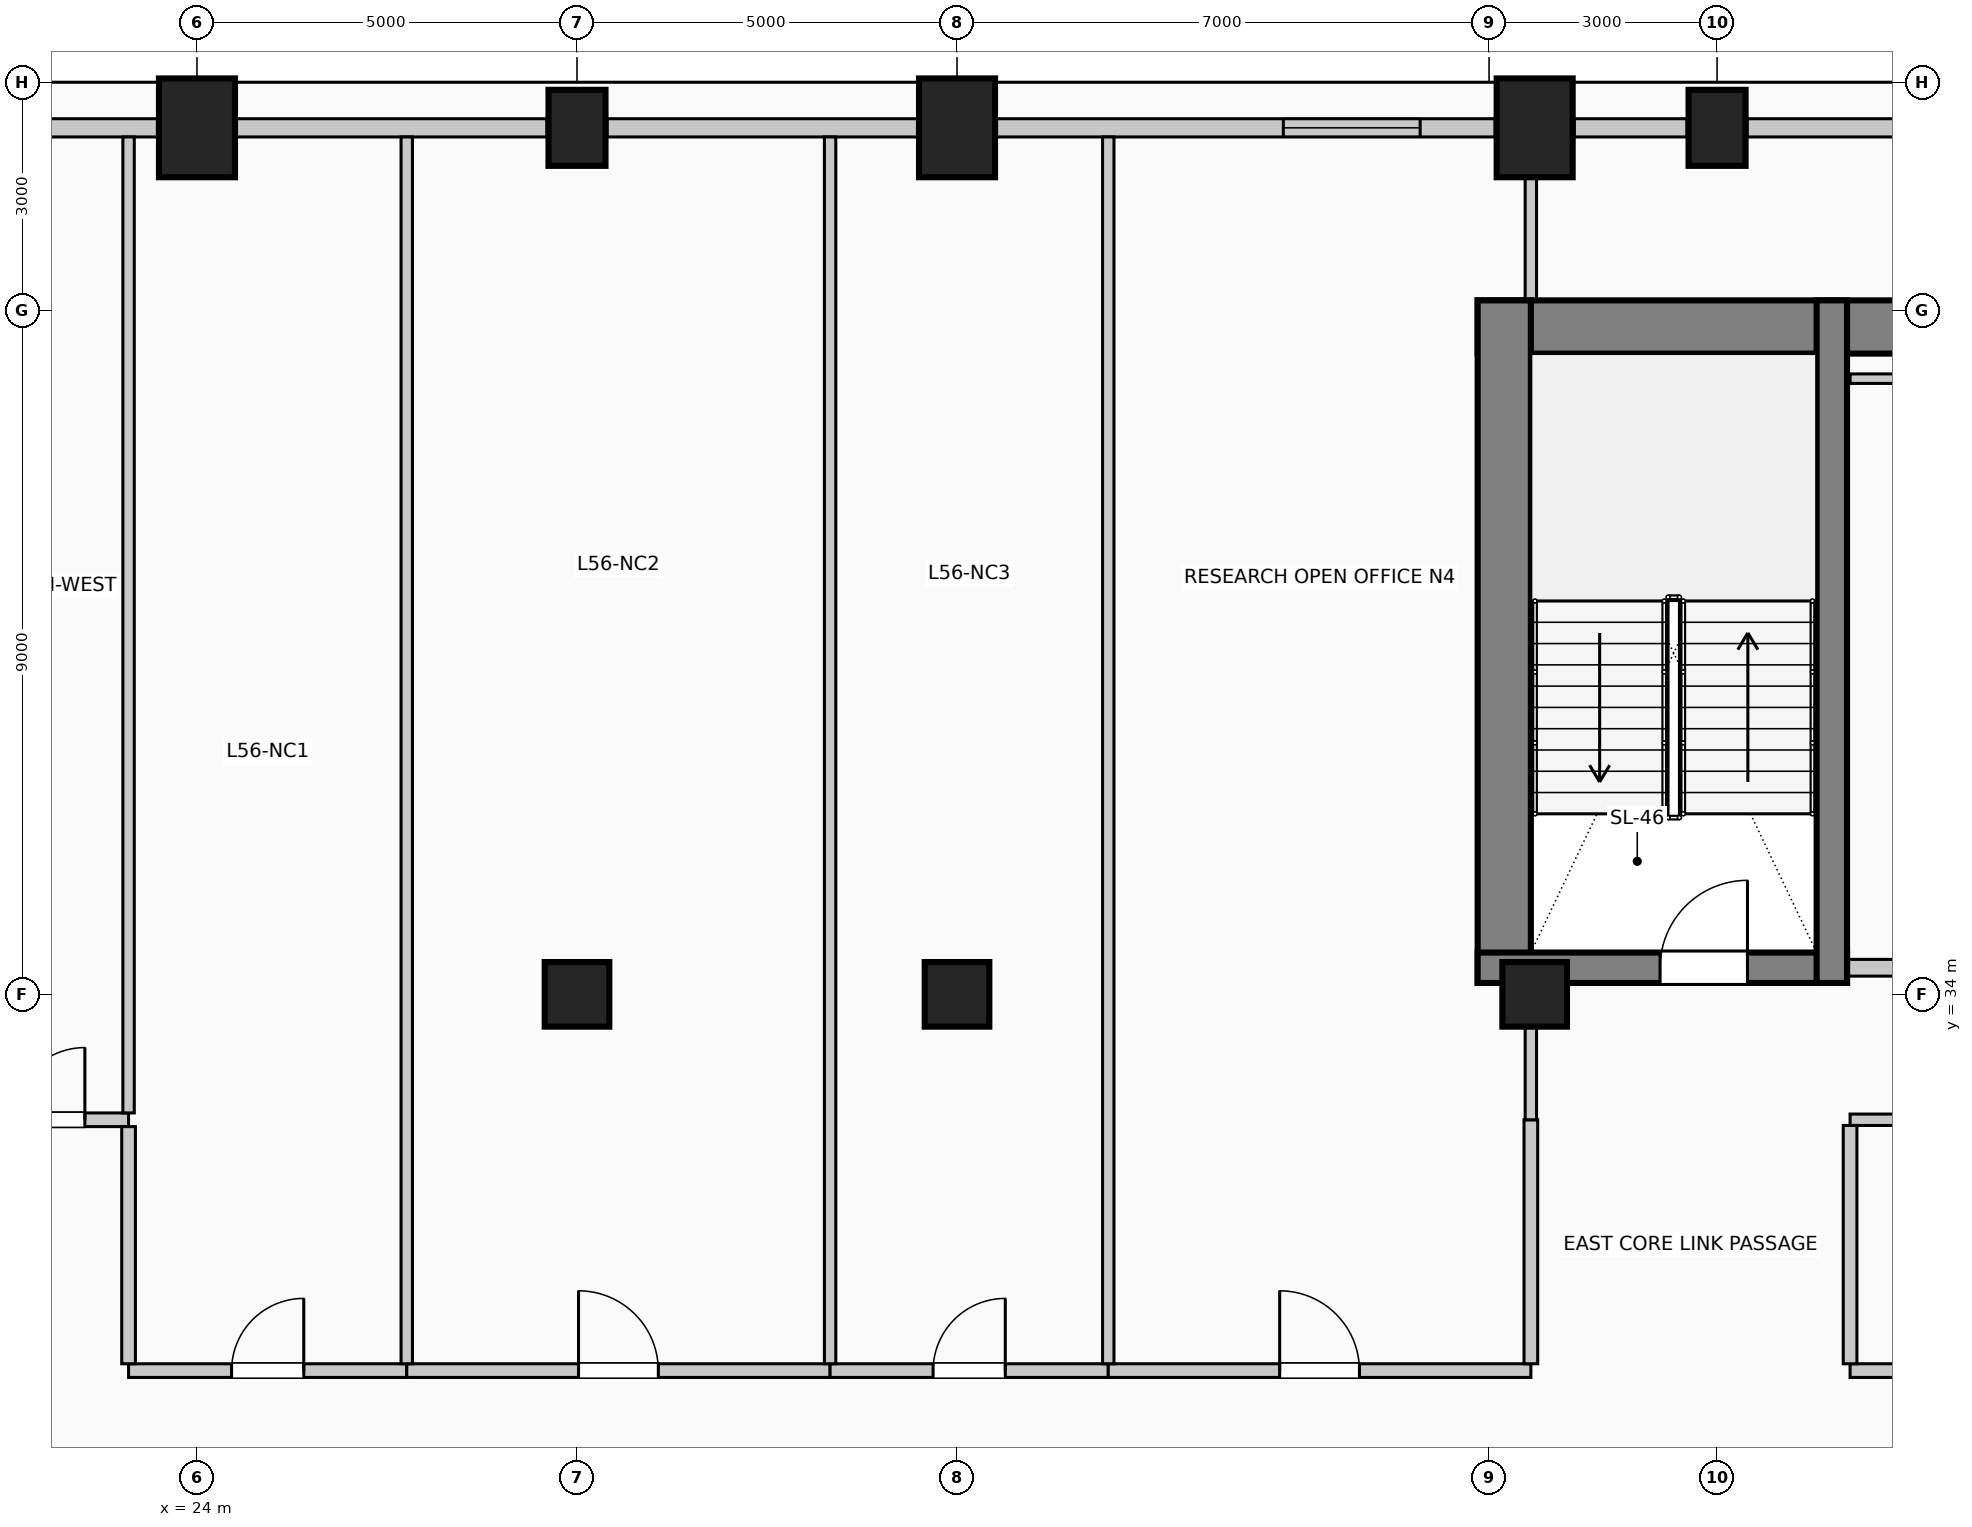
"""IFC4 building model, lengths in metres.
Left out: names, types, materials, properties, quantities, classifications, styles, units other than length and angle.
Written with IfcOpenShell. Run it as: python <this file> out.ifc"""

import sys

from ifc_helpers import new_model, si_unit, direction, frame, frame_2d, origin, origin_2d, place, context, subcontext, project, spatial, rectangle, circle, extrude, element, fill, save


model = new_model("IFC4")
c1 = context("Model", 3, precision=1e-05, world=origin(), true_north=direction((0.0, 1.0)))
c2 = subcontext(c1, "Body", "Model", "MODEL_VIEW")
j1 = project(units=[si_unit("LENGTHUNIT", "METRE"), si_unit("PLANEANGLEUNIT", "RADIAN")], contexts=[c1])
p1 = place(None, origin())
s1 = spatial("IfcSite", under=j1, at=p1, CompositionType="ELEMENT")
p2 = place(p1, origin())
s2 = spatial("IfcBuilding", under=s1, at=p2, CompositionType="ELEMENT")
p3 = place(p2, frame((0.0, 0.0, 230.6)))
s3 = spatial("IfcBuildingStorey", under=s2, at=p3, CompositionType="ELEMENT", Elevation=230.6)
p4 = place(p3, frame((40.85, 42.78, 0.0), z_axis=(0.0, 0.0, 1.0), x_axis=(1.0, 0.0, 0.0)))
e1 = element("IfcWall", 1, at=p4, inside=s3, PredefinedType="SHEAR", context=c2, shape_type="SweptSolid", body=[
    extrude(rectangle(XDim=14.3, YDim=0.7, at=frame_2d((7.15, 0.0))), origin(), (0.0, 0.0, 1.0), 4.0),
])
p5 = place(p3, frame((41.2, 34.15, 0.0), z_axis=(0.0, 0.0, 1.0), x_axis=(0.0, 1.0, 0.0)))
e2 = element("IfcWall", 2, at=p5, inside=s3, PredefinedType="SHEAR", context=c2, shape_type="SweptSolid", body=[
    extrude(rectangle(XDim=8.98, YDim=0.7, at=frame_2d((4.49, 0.0))), origin(), (0.0, 0.0, 1.0), 4.0),
])
p6 = place(p3, frame((40.85, 34.35, 0.0), z_axis=(0.0, 0.0, 1.0), x_axis=(1.0, 0.0, 0.0)))
e3 = element("IfcWall", 3, at=p6, inside=s3, PredefinedType="SHEAR", context=c2, shape_type="SweptSolid", body=[
    extrude(rectangle(XDim=4.86, YDim=0.4, at=frame_2d((2.43, 0.0))), origin(), (0.0, 0.0, 1.0), 4.0),
])
p7 = place(p6, frame((2.4, 0.0, 0.0)))
e4 = element("IfcOpeningElement", 4, at=p7, cuts=e3, PredefinedType="OPENING", context=c2, shape_type="SweptSolid", body=[
    extrude(rectangle(XDim=1.15, YDim=2.2, at=frame_2d((0.575, 1.1))), frame((0.0, 0.21, 0.0), z_axis=(0.0, -1.0, 0.0), x_axis=(1.0, 0.0, 0.0)), (0.0, 0.0, 1.0), 0.42),
])
p8 = place(p3, frame((45.51, 34.15, 0.0), z_axis=(0.0, 0.0, 1.0), x_axis=(0.0, 1.0, 0.0)))
e5 = element("IfcWall", 5, at=p8, inside=s3, PredefinedType="SHEAR", context=c2, shape_type="SweptSolid", body=[
    extrude(rectangle(XDim=8.98, YDim=0.4, at=frame_2d((4.49, 0.0))), origin(), (0.0, 0.0, 1.0), 4.0),
])
p9 = place(p3, frame((24.0, 45.4, 0.0), z_axis=(0.0, 0.0, 1.0), x_axis=(1.0, 0.0, 0.0)))
e6 = element("IfcColumn", 6, at=p9, inside=s3, PredefinedType="COLUMN", context=c2, shape_type="SweptSolid", body=[
    extrude(rectangle(XDim=1.0, YDim=1.3, at=origin_2d()), origin(), (0.0, 0.0, 1.0), 4.0),
])
p10 = place(p3, frame((29.0, 45.4, 0.0), z_axis=(0.0, 0.0, 1.0), x_axis=(1.0, 0.0, 0.0)))
e7 = element("IfcColumn", 7, at=p10, inside=s3, PredefinedType="COLUMN", context=c2, shape_type="SweptSolid", body=[
    extrude(rectangle(XDim=0.75, YDim=1.0, at=origin_2d()), origin(), (0.0, 0.0, 1.0), 4.0),
])
for number, where, z_axis, x_axis in (
    (8, (34.0, 45.4, 0.0), (0.0, 0.0, 1.0), (1.0, 0.0, 0.0)),
    (9, (41.6, 45.4, 0.0), (0.0, 0.0, 1.0), (1.0, 0.0, 0.0)),
):
    element("IfcColumn", number, at=place(p3, frame(where, z_axis=z_axis, x_axis=x_axis)), inside=s3, PredefinedType="COLUMN", context=c2, shape_type="SweptSolid", body=[
        extrude(rectangle(XDim=1.0, YDim=1.3, at=origin_2d()), origin(), (0.0, 0.0, 1.0), 4.0),
    ])
p11 = place(p3, frame((44.0, 45.4, 0.0), z_axis=(0.0, 0.0, 1.0), x_axis=(1.0, 0.0, 0.0)))
e10 = element("IfcColumn", 10, at=p11, inside=s3, PredefinedType="COLUMN", context=c2, shape_type="SweptSolid", body=[
    extrude(rectangle(XDim=0.75, YDim=1.0, at=origin_2d()), origin(), (0.0, 0.0, 1.0), 4.0),
])
for number, where, z_axis, x_axis in (
    (11, (29.0, 34.0, 0.0), (0.0, 0.0, 1.0), (1.0, 0.0, 0.0)),
    (12, (41.6, 34.0, 0.0), (0.0, 0.0, 1.0), (1.0, 0.0, 0.0)),
    (13, (34.0, 34.0, 0.0), (0.0, 0.0, 1.0), (1.0, 0.0, 0.0)),
):
    element("IfcColumn", number, at=place(p3, frame(where, z_axis=z_axis, x_axis=x_axis)), inside=s3, PredefinedType="COLUMN", context=c2, shape_type="SweptSolid", body=[
        extrude(circle(Radius=0.425, at=origin_2d()), origin(), (0.0, 0.0, 1.0), 4.0),
    ])
p12 = place(p3, frame((16.92, 45.4, 0.0), z_axis=(0.0, 0.0, 1.0), x_axis=(1.0, 0.0, 0.0)))
e14 = element("IfcWall", 14, at=p12, inside=s3, PredefinedType="SOLIDWALL", context=c2, shape_type="SweptSolid", body=[
    extrude(rectangle(XDim=6.56, YDim=0.24, at=frame_2d((3.28, 0.0))), origin(), (0.0, 0.0, 1.0), 3.0),
])
p13 = place(p12, frame((0.987, 0.0, 0.42)))
e15 = element("IfcOpeningElement", 15, at=p13, cuts=e14, PredefinedType="OPENING", context=c2, shape_type="SweptSolid", body=[
    extrude(rectangle(XDim=1.8, YDim=2.2, at=frame_2d((0.9, 1.1))), frame((0.0, 0.13, 0.0), z_axis=(0.0, -1.0, 0.0), x_axis=(1.0, 0.0, 0.0)), (0.0, 0.0, 1.0), 0.26),
])
for number, where, z_axis, x_axis in (
    (16, (24.52, 45.4, 0.0), (0.0, 0.0, 1.0), (1.0, 0.0, 0.0)),
    (17, (29.395, 45.4, 0.0), (0.0, 0.0, 1.0), (1.0, 0.0, 0.0)),
):
    element("IfcWall", number, at=place(p3, frame(where, z_axis=z_axis, x_axis=x_axis)), inside=s3, PredefinedType="SOLIDWALL", context=c2, shape_type="SweptSolid", body=[
        extrude(rectangle(XDim=4.085, YDim=0.24, at=frame_2d((2.042, 0.0))), origin(), (0.0, 0.0, 1.0), 3.0),
    ])
p14 = place(p3, frame((34.52, 45.4, 0.0), z_axis=(0.0, 0.0, 1.0), x_axis=(1.0, 0.0, 0.0)))
e18 = element("IfcWall", 18, at=p14, inside=s3, PredefinedType="SOLIDWALL", context=c2, shape_type="SweptSolid", body=[
    extrude(rectangle(XDim=6.56, YDim=0.24, at=frame_2d((3.28, 0.0))), origin(), (0.0, 0.0, 1.0), 3.0),
])
p15 = place(p14, frame((3.773, 0.0, 0.42)))
e19 = element("IfcOpeningElement", 19, at=p15, cuts=e18, PredefinedType="OPENING", context=c2, shape_type="SweptSolid", body=[
    extrude(rectangle(XDim=1.8, YDim=2.2, at=frame_2d((0.9, 1.1))), frame((0.0, 0.13, 0.0), z_axis=(0.0, -1.0, 0.0), x_axis=(1.0, 0.0, 0.0)), (0.0, 0.0, 1.0), 0.26),
])
p16 = place(p3, frame((42.12, 45.4, 0.0), z_axis=(0.0, 0.0, 1.0), x_axis=(1.0, 0.0, 0.0)))
e20 = element("IfcWall", 20, at=p16, inside=s3, PredefinedType="SOLIDWALL", context=c2, shape_type="SweptSolid", body=[
    extrude(rectangle(XDim=1.485, YDim=0.24, at=frame_2d((0.742, 0.0))), origin(), (0.0, 0.0, 1.0), 3.0),
])
p17 = place(p3, frame((44.395, 45.4, 0.0), z_axis=(0.0, 0.0, 1.0), x_axis=(1.0, 0.0, 0.0)))
e21 = element("IfcWall", 21, at=p17, inside=s3, PredefinedType="SOLIDWALL", context=c2, shape_type="SweptSolid", body=[
    extrude(rectangle(XDim=4.71, YDim=0.24, at=frame_2d((2.355, 0.0))), origin(), (0.0, 0.0, 1.0), 3.0),
])
p18 = place(p3, frame((45.72, 34.35, 0.0), z_axis=(0.0, 0.0, 1.0), x_axis=(1.0, 0.0, 0.0)))
e22 = element("IfcWall", 22, at=p18, inside=s3, PredefinedType="PARTITIONING", context=c2, shape_type="SweptSolid", body=[
    extrude(rectangle(XDim=4.56, YDim=0.22, at=frame_2d((2.28, 0.0))), origin(), (0.0, 0.0, 1.0), 3.75),
])
p19 = place(p18, frame((0.65, 0.0, 0.0)))
e23 = element("IfcOpeningElement", 23, at=p19, cuts=e22, PredefinedType="OPENING", context=c2, shape_type="SweptSolid", body=[
    extrude(rectangle(XDim=0.92, YDim=2.1, at=frame_2d((0.46, 1.05))), frame((0.0, 0.12, 0.0), z_axis=(0.0, -1.0, 0.0), x_axis=(1.0, 0.0, 0.0)), (0.0, 0.0, 1.0), 0.24),
])
p20 = place(p18, frame((2.95, 0.0, 0.0)))
e24 = element("IfcOpeningElement", 24, at=p20, cuts=e22, PredefinedType="OPENING", context=c2, shape_type="SweptSolid", body=[
    extrude(rectangle(XDim=0.88, YDim=2.1, at=frame_2d((0.44, 1.05))), frame((0.0, 0.12, 0.0), z_axis=(0.0, -1.0, 0.0), x_axis=(1.0, 0.0, 0.0)), (0.0, 0.0, 1.0), 0.24),
])
p21 = place(p3, frame((23.1, 29.05, 0.0), z_axis=(0.0, 0.0, 1.0), x_axis=(1.0, 0.0, 0.0)))
e25 = element("IfcWall", 25, at=p21, inside=s3, PredefinedType="PARTITIONING", context=c2, shape_type="SweptSolid", body=[
    extrude(rectangle(XDim=3.66, YDim=0.18, at=frame_2d((1.83, 0.0))), origin(), (0.0, 0.0, 1.0), 3.75),
])
p22 = place(p21, frame((1.355, 0.0, 0.0)))
e26 = element("IfcOpeningElement", 26, at=p22, cuts=e25, PredefinedType="OPENING", context=c2, shape_type="SweptSolid", body=[
    extrude(rectangle(XDim=0.95, YDim=2.15, at=frame_2d((0.475, 1.075))), frame((0.0, 0.1, 0.0), z_axis=(0.0, -1.0, 0.0), x_axis=(1.0, 0.0, 0.0)), (0.0, 0.0, 1.0), 0.2),
])
p23 = place(p3, frame((26.76, 29.05, 0.0), z_axis=(0.0, 0.0, 1.0), x_axis=(1.0, 0.0, 0.0)))
e27 = element("IfcWall", 27, at=p23, inside=s3, PredefinedType="PARTITIONING", context=c2, shape_type="SweptSolid", body=[
    extrude(rectangle(XDim=5.57, YDim=0.18, at=frame_2d((2.785, 0.0))), origin(), (0.0, 0.0, 1.0), 3.75),
])
p24 = place(p23, frame((2.26, 0.0, 0.0)))
e28 = element("IfcOpeningElement", 28, at=p24, cuts=e27, PredefinedType="OPENING", context=c2, shape_type="SweptSolid", body=[
    extrude(rectangle(XDim=1.05, YDim=2.15, at=frame_2d((0.525, 1.075))), frame((0.0, 0.1, 0.0), z_axis=(0.0, -1.0, 0.0), x_axis=(1.0, 0.0, 0.0)), (0.0, 0.0, 1.0), 0.2),
])
p25 = place(p3, frame((32.33, 29.05, 0.0), z_axis=(0.0, 0.0, 1.0), x_axis=(1.0, 0.0, 0.0)))
e29 = element("IfcWall", 29, at=p25, inside=s3, PredefinedType="PARTITIONING", context=c2, shape_type="SweptSolid", body=[
    extrude(rectangle(XDim=3.66, YDim=0.18, at=frame_2d((1.83, 0.0))), origin(), (0.0, 0.0, 1.0), 3.75),
])
p26 = place(p25, frame((1.355, 0.0, 0.0)))
e30 = element("IfcOpeningElement", 30, at=p26, cuts=e29, PredefinedType="OPENING", context=c2, shape_type="SweptSolid", body=[
    extrude(rectangle(XDim=0.95, YDim=2.15, at=frame_2d((0.475, 1.075))), frame((0.0, 0.1, 0.0), z_axis=(0.0, -1.0, 0.0), x_axis=(1.0, 0.0, 0.0)), (0.0, 0.0, 1.0), 0.2),
])
p27 = place(p3, frame((35.99, 29.05, 0.0), z_axis=(0.0, 0.0, 1.0), x_axis=(1.0, 0.0, 0.0)))
e31 = element("IfcWall", 31, at=p27, inside=s3, PredefinedType="PARTITIONING", context=c2, shape_type="SweptSolid", body=[
    extrude(rectangle(XDim=5.56, YDim=0.18, at=frame_2d((2.78, 0.0))), origin(), (0.0, 0.0, 1.0), 3.75),
])
p28 = place(p27, frame((2.255, 0.0, 0.0)))
e32 = element("IfcOpeningElement", 32, at=p28, cuts=e31, PredefinedType="OPENING", context=c2, shape_type="SweptSolid", body=[
    extrude(rectangle(XDim=1.05, YDim=2.15, at=frame_2d((0.525, 1.075))), frame((0.0, 0.1, 0.0), z_axis=(0.0, -1.0, 0.0), x_axis=(1.0, 0.0, 0.0)), (0.0, 0.0, 1.0), 0.2),
])
p29 = place(p3, frame((45.75, 29.05, 0.0), z_axis=(0.0, 0.0, 1.0), x_axis=(1.0, 0.0, 0.0)))
e33 = element("IfcWall", 33, at=p29, inside=s3, PredefinedType="PARTITIONING", context=c2, shape_type="SweptSolid", body=[
    extrude(rectangle(XDim=11.53, YDim=0.18, at=frame_2d((5.765, 0.0))), origin(), (0.0, 0.0, 1.0), 3.75),
])
p30 = place(p29, frame((5.29, 0.0, 0.0)))
e34 = element("IfcOpeningElement", 34, at=p30, cuts=e33, PredefinedType="OPENING", context=c2, shape_type="SweptSolid", body=[
    extrude(rectangle(XDim=0.95, YDim=2.15, at=frame_2d((0.475, 1.075))), frame((0.0, 0.1, 0.0), z_axis=(0.0, -1.0, 0.0), x_axis=(1.0, 0.0, 0.0)), (0.0, 0.0, 1.0), 0.2),
])
p31 = place(p3, frame((21.0, 32.35, 0.0), z_axis=(0.0, 0.0, 1.0), x_axis=(1.0, 0.0, 0.0)))
e35 = element("IfcWall", 35, at=p31, inside=s3, PredefinedType="PARTITIONING", context=c2, shape_type="SweptSolid", body=[
    extrude(rectangle(XDim=2.1, YDim=0.18, at=frame_2d((1.05, 0.0))), origin(), (0.0, 0.0, 1.0), 3.75),
])
p32 = place(p31, frame((0.575, 0.0, 0.0)))
e36 = element("IfcOpeningElement", 36, at=p32, cuts=e35, PredefinedType="OPENING", context=c2, shape_type="SweptSolid", body=[
    extrude(rectangle(XDim=0.95, YDim=2.15, at=frame_2d((0.475, 1.075))), frame((0.0, 0.1, 0.0), z_axis=(0.0, -1.0, 0.0), x_axis=(1.0, 0.0, 0.0)), (0.0, 0.0, 1.0), 0.2),
])
p33 = place(p3, frame((45.75, 32.35, 0.0), z_axis=(0.0, 0.0, 1.0), x_axis=(1.0, 0.0, 0.0)))
e37 = element("IfcWall", 37, at=p33, inside=s3, PredefinedType="PARTITIONING", context=c2, shape_type="SweptSolid", body=[
    extrude(rectangle(XDim=8.7, YDim=0.15, at=frame_2d((4.35, 0.0))), origin(), (0.0, 0.0, 1.0), 3.75),
])
p34 = place(p3, frame((45.75, 42.1, 0.0), z_axis=(0.0, 0.0, 1.0), x_axis=(1.0, 0.0, 0.0)))
e38 = element("IfcWall", 38, at=p34, inside=s3, PredefinedType="PARTITIONING", context=c2, shape_type="SweptSolid", body=[
    extrude(rectangle(XDim=2.25, YDim=0.125, at=frame_2d((1.125, 0.0))), origin(), (0.0, 0.0, 1.0), 3.75),
])
p35 = place(p3, frame((23.1, 29.14, 0.0), z_axis=(0.0, 0.0, 1.0), x_axis=(0.0, 1.0, 0.0)))
e39 = element("IfcWall", 39, at=p35, inside=s3, PredefinedType="PARTITIONING", context=c2, shape_type="SweptSolid", body=[
    extrude(rectangle(XDim=3.12, YDim=0.18, at=frame_2d((1.56, 0.0))), origin(), (0.0, 0.0, 1.0), 3.75),
])
p36 = place(p3, frame((23.1, 32.44, 0.0), z_axis=(0.0, 0.0, 1.0), x_axis=(0.0, 1.0, 0.0)))
e40 = element("IfcWall", 40, at=p36, inside=s3, PredefinedType="PARTITIONING", context=c2, shape_type="SweptSolid", body=[
    extrude(rectangle(XDim=12.84, YDim=0.15, at=frame_2d((6.42, 0.0))), origin(), (0.0, 0.0, 1.0), 3.75),
])
for number, where, z_axis, x_axis in (
    (41, (26.76, 29.14, 0.0), (0.0, 0.0, 1.0), (0.0, 1.0, 0.0)),
    (42, (32.33, 29.14, 0.0), (0.0, 0.0, 1.0), (0.0, 1.0, 0.0)),
    (43, (35.99, 29.14, 0.0), (0.0, 0.0, 1.0), (0.0, 1.0, 0.0)),
):
    element("IfcWall", number, at=place(p3, frame(where, z_axis=z_axis, x_axis=x_axis)), inside=s3, PredefinedType="PARTITIONING", context=c2, shape_type="SweptSolid", body=[
        extrude(rectangle(XDim=16.14, YDim=0.15, at=frame_2d((8.07, 0.0))), origin(), (0.0, 0.0, 1.0), 3.75),
    ])
p37 = place(p3, frame((41.55, 29.14, 0.0), z_axis=(0.0, 0.0, 1.0), x_axis=(0.0, 1.0, 0.0)))
e44 = element("IfcWall", 44, at=p37, inside=s3, PredefinedType="PARTITIONING", context=c2, shape_type="SweptSolid", body=[
    extrude(rectangle(XDim=3.21, YDim=0.18, at=frame_2d((1.605, 0.0))), origin(), (0.0, 0.0, 1.0), 3.145),
])
p38 = place(p3, frame((41.55, 32.35, 0.0), z_axis=(0.0, 0.0, 1.0), x_axis=(0.0, 1.0, 0.0)))
e45 = element("IfcWall", 45, at=p38, inside=s3, PredefinedType="PARTITIONING", context=c2, shape_type="SweptSolid", body=[
    extrude(rectangle(XDim=1.225, YDim=0.15, at=frame_2d((0.612, 0.0))), origin(), (0.0, 0.0, 1.0), 3.145),
])
p39 = place(p3, frame((41.55, 43.13, 0.0), z_axis=(0.0, 0.0, 1.0), x_axis=(0.0, 1.0, 0.0)))
e46 = element("IfcWall", 46, at=p39, inside=s3, PredefinedType="PARTITIONING", context=c2, shape_type="SweptSolid", body=[
    extrude(rectangle(XDim=1.62, YDim=0.15, at=frame_2d((0.81, 0.0))), origin(), (0.0, 0.0, 1.0), 3.75),
])
p40 = place(p3, frame((45.75, 29.14, 0.0), z_axis=(0.0, 0.0, 1.0), x_axis=(0.0, 1.0, 0.0)))
e47 = element("IfcWall", 47, at=p40, inside=s3, PredefinedType="PARTITIONING", context=c2, shape_type="SweptSolid", body=[
    extrude(rectangle(XDim=3.135, YDim=0.18, at=frame_2d((1.567, 0.0))), origin(), (0.0, 0.0, 1.0), 3.75),
])
p41 = place(p15, origin())
e48 = element("IfcWindow", 48, at=p41, inside=s3, PartitioningType="SINGLE_PANEL", PredefinedType="WINDOW", context=c2, shape_type="SweptSolid", body=[
    extrude(rectangle(XDim=1.8, YDim=2.2, at=frame_2d((0.9, 1.1))), frame((0.0, 0.03, 0.0), z_axis=(0.0, -1.0, 0.0), x_axis=(1.0, 0.0, 0.0)), (0.0, 0.0, 1.0), 0.06),
])
fill(e19, e48)
p42 = place(p7, origin())
e49 = element("IfcDoor", 49, at=p42, inside=s3, OperationType="SINGLE_SWING_RIGHT", PredefinedType="DOOR", context=c2, shape_type="SweptSolid", body=[
    extrude(rectangle(XDim=1.15, YDim=2.2, at=frame_2d((0.575, 1.1))), frame((0.0, 0.025, 0.0), z_axis=(0.0, -1.0, 0.0), x_axis=(1.0, 0.0, 0.0)), (0.0, 0.0, 1.0), 0.05),
])
fill(e4, e49)
p43 = place(p22, origin())
e50 = element("IfcDoor", 50, at=p43, inside=s3, OperationType="SINGLE_SWING_RIGHT", PredefinedType="DOOR", context=c2, shape_type="SweptSolid", body=[
    extrude(rectangle(XDim=0.95, YDim=2.15, at=frame_2d((0.475, 1.075))), frame((0.0, 0.025, 0.0), z_axis=(0.0, -1.0, 0.0), x_axis=(1.0, 0.0, 0.0)), (0.0, 0.0, 1.0), 0.05),
])
fill(e26, e50)
p44 = place(p24, origin())
e51 = element("IfcDoor", 51, at=p44, inside=s3, OperationType="SINGLE_SWING_LEFT", PredefinedType="DOOR", context=c2, shape_type="SweptSolid", body=[
    extrude(rectangle(XDim=1.05, YDim=2.15, at=frame_2d((0.525, 1.075))), frame((0.0, 0.025, 0.0), z_axis=(0.0, -1.0, 0.0), x_axis=(1.0, 0.0, 0.0)), (0.0, 0.0, 1.0), 0.05),
])
fill(e28, e51)
p45 = place(p26, origin())
e52 = element("IfcDoor", 52, at=p45, inside=s3, OperationType="SINGLE_SWING_RIGHT", PredefinedType="DOOR", context=c2, shape_type="SweptSolid", body=[
    extrude(rectangle(XDim=0.95, YDim=2.15, at=frame_2d((0.475, 1.075))), frame((0.0, 0.025, 0.0), z_axis=(0.0, -1.0, 0.0), x_axis=(1.0, 0.0, 0.0)), (0.0, 0.0, 1.0), 0.05),
])
fill(e30, e52)
p46 = place(p28, origin())
e53 = element("IfcDoor", 53, at=p46, inside=s3, OperationType="SINGLE_SWING_LEFT", PredefinedType="DOOR", context=c2, shape_type="SweptSolid", body=[
    extrude(rectangle(XDim=1.05, YDim=2.15, at=frame_2d((0.525, 1.075))), frame((0.0, 0.025, 0.0), z_axis=(0.0, -1.0, 0.0), x_axis=(1.0, 0.0, 0.0)), (0.0, 0.0, 1.0), 0.05),
])
fill(e32, e53)
p47 = place(p32, origin())
e54 = element("IfcDoor", 54, at=p47, inside=s3, OperationType="SINGLE_SWING_RIGHT", PredefinedType="DOOR", context=c2, shape_type="SweptSolid", body=[
    extrude(rectangle(XDim=0.95, YDim=2.15, at=frame_2d((0.475, 1.075))), frame((0.0, 0.025, 0.0), z_axis=(0.0, -1.0, 0.0), x_axis=(1.0, 0.0, 0.0)), (0.0, 0.0, 1.0), 0.05),
])
fill(e36, e54)
save(model, sys.argv[1])
